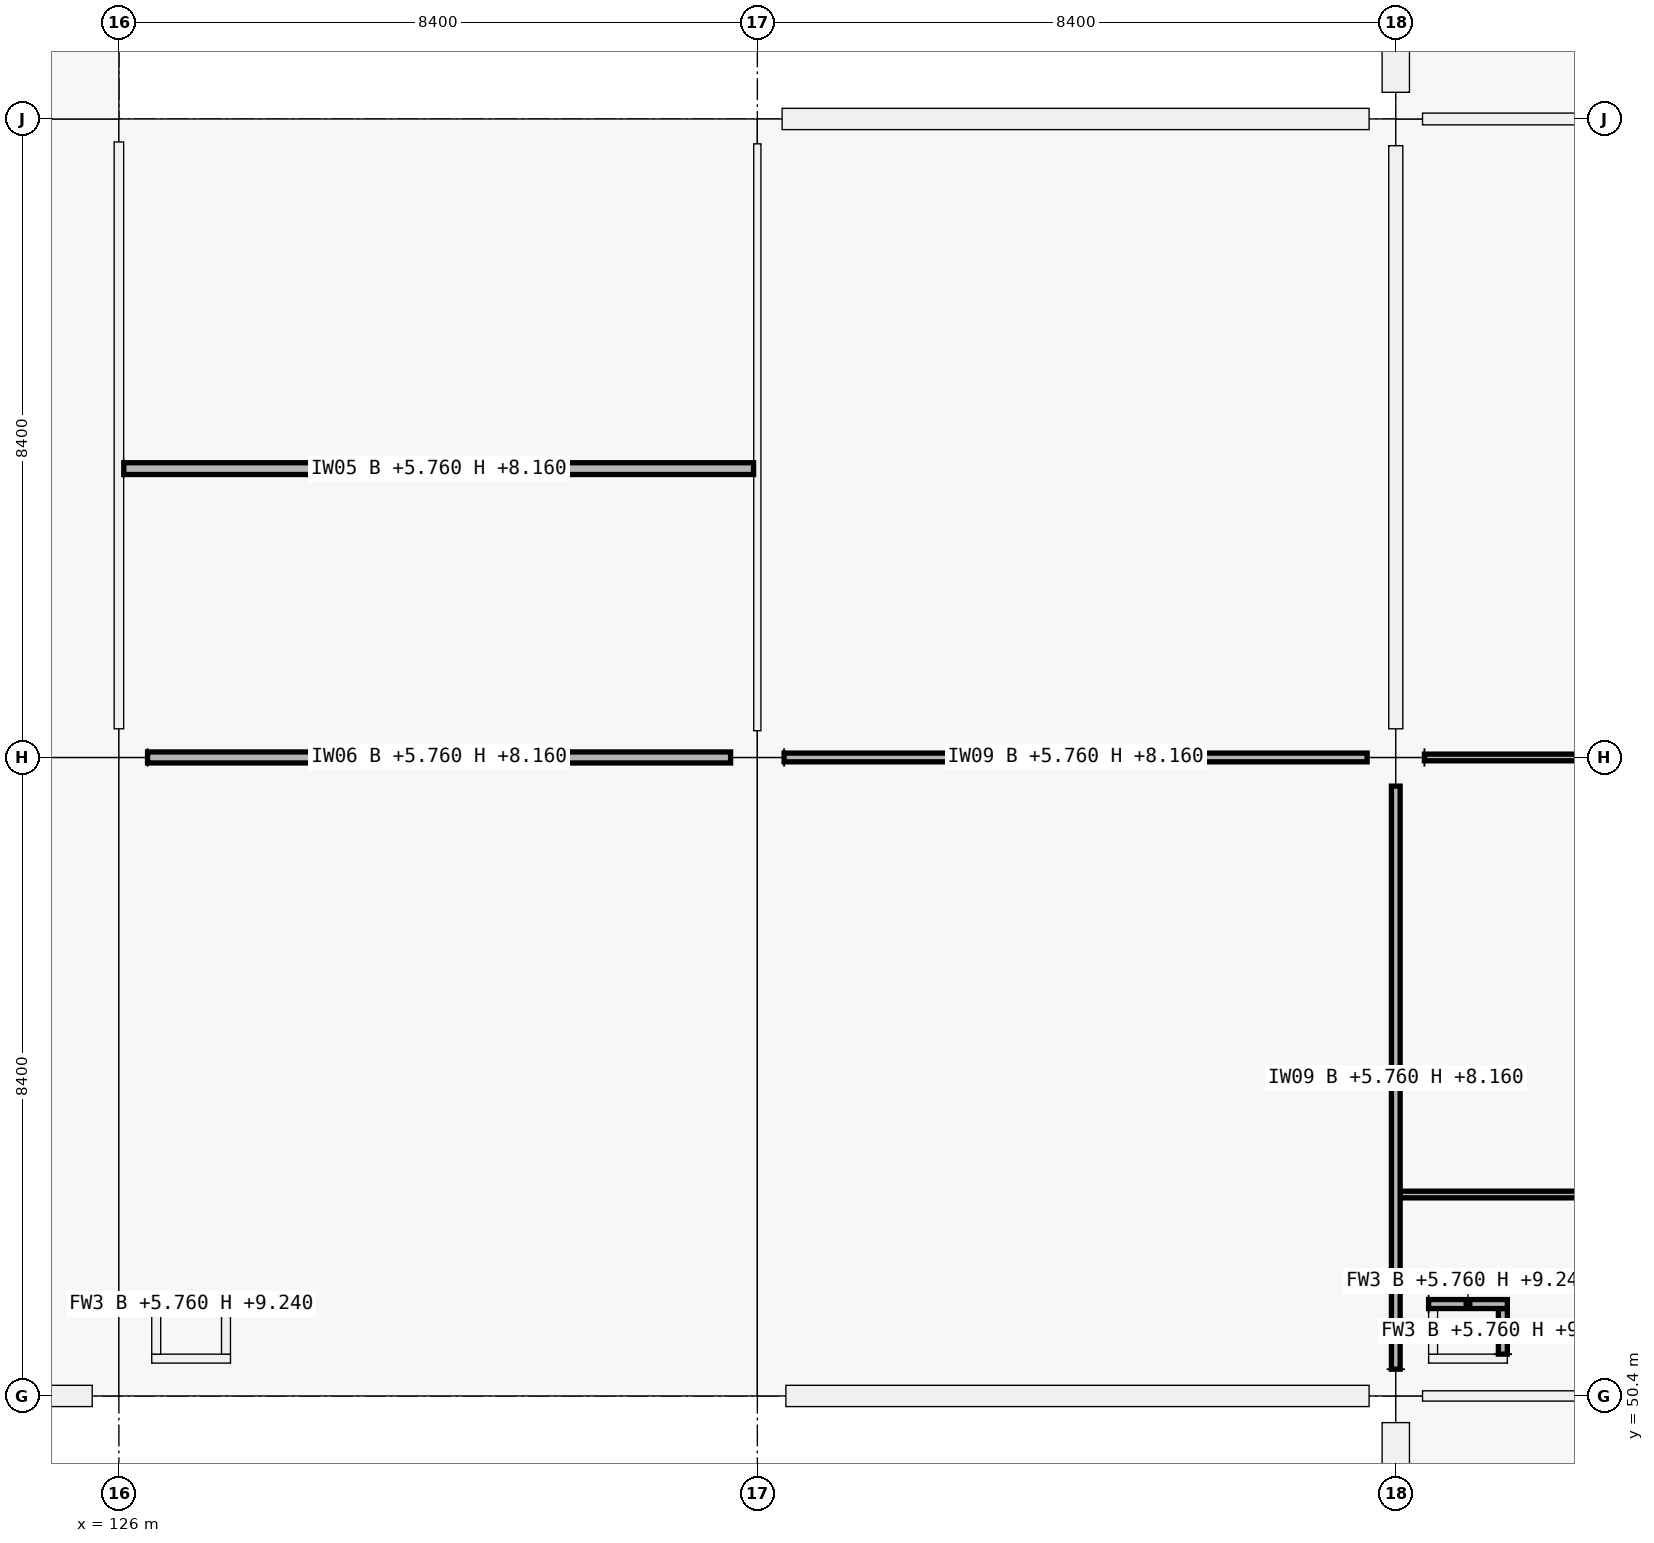
"""IFC4 building model, lengths in metres.
Left out: names, types, materials, properties, quantities, classifications, styles, units other than length and angle.
Written with IfcOpenShell. Run it as: python <this file> out.ifc"""

import sys

from ifc_helpers import new_model, si_unit, direction, frame, frame_2d, origin, origin_2d, place, context, subcontext, project, spatial, rectangle, extrude, element, fill, save


model = new_model("IFC4")
c1 = context("Model", 3, precision=1e-05, world=origin(), true_north=direction((0.0, 1.0)))
c2 = subcontext(c1, "Body", "Model", "MODEL_VIEW")
j1 = project(units=[si_unit("LENGTHUNIT", "METRE"), si_unit("PLANEANGLEUNIT", "RADIAN")], contexts=[c1])
p1 = place(None, origin())
s1 = spatial("IfcSite", under=j1, at=p1, CompositionType="ELEMENT")
p2 = place(p1, origin())
s2 = spatial("IfcBuilding", under=s1, at=p2, CompositionType="ELEMENT")
p3 = place(p2, frame((0.0, 0.0, 5.76)))
s3 = spatial("IfcBuildingStorey", under=s2, at=p3, CompositionType="ELEMENT", Elevation=5.76)
p4 = place(p3, frame((126.0, 50.4, 0.0), z_axis=(0.0, 0.0, 1.0), x_axis=(1.0, 0.0, 0.0)))
e1 = element("IfcColumn", 1, at=p4, inside=s3, PredefinedType="COLUMN", context=c2, shape_type="SweptSolid", body=[
    extrude(rectangle(XDim=0.7, YDim=0.7, at=origin_2d()), origin(), (0.0, 0.0, 1.0), 4.5),
])
p5 = place(p3, frame((126.0, 58.8, 0.0), z_axis=(0.0, 0.0, 1.0), x_axis=(1.0, 0.0, 0.0)))
e2 = element("IfcColumn", 2, at=p5, inside=s3, PredefinedType="COLUMN", context=c2, shape_type="SweptSolid", body=[
    extrude(rectangle(XDim=0.75, YDim=0.75, at=origin_2d()), origin(), (0.0, 0.0, 1.0), 4.5),
])
p6 = place(p3, frame((126.0, 67.2, 0.0), z_axis=(0.0, 0.0, 1.0), x_axis=(1.0, 0.0, 0.0)))
e3 = element("IfcColumn", 3, at=p6, inside=s3, PredefinedType="COLUMN", context=c2, shape_type="SweptSolid", body=[
    extrude(rectangle(XDim=0.6, YDim=0.6, at=origin_2d()), origin(), (0.0, 0.0, 1.0), 4.5),
])
p7 = place(p3, frame((134.4, 50.4, 0.0), z_axis=(0.0, 0.0, 1.0), x_axis=(1.0, 0.0, 0.0)))
e4 = element("IfcColumn", 4, at=p7, inside=s3, PredefinedType="COLUMN", context=c2, shape_type="SweptSolid", body=[
    extrude(rectangle(XDim=0.75, YDim=0.75, at=origin_2d()), origin(), (0.0, 0.0, 1.0), 4.5),
])
p8 = place(p3, frame((134.4, 58.8, 0.0), z_axis=(0.0, 0.0, 1.0), x_axis=(1.0, 0.0, 0.0)))
e5 = element("IfcColumn", 5, at=p8, inside=s3, PredefinedType="COLUMN", context=c2, shape_type="SweptSolid", body=[
    extrude(rectangle(XDim=0.7, YDim=0.7, at=origin_2d()), origin(), (0.0, 0.0, 1.0), 4.5),
])
p9 = place(p3, frame((134.4, 67.2, 0.0), z_axis=(0.0, 0.0, 1.0), x_axis=(1.0, 0.0, 0.0)))
e6 = element("IfcColumn", 6, at=p9, inside=s3, PredefinedType="COLUMN", context=c2, shape_type="SweptSolid", body=[
    extrude(rectangle(XDim=0.65, YDim=0.65, at=origin_2d()), origin(), (0.0, 0.0, 1.0), 4.5),
])
p10 = place(p3, frame((142.8, 50.4, 0.0), z_axis=(0.0, 0.0, 1.0), x_axis=(1.0, 0.0, 0.0)))
e7 = element("IfcColumn", 7, at=p10, inside=s3, PredefinedType="COLUMN", context=c2, shape_type="SweptSolid", body=[
    extrude(rectangle(XDim=0.7, YDim=0.7, at=origin_2d()), origin(), (0.0, 0.0, 1.0), 4.5),
])
p11 = place(p3, frame((142.8, 58.8, 0.0), z_axis=(0.0, 0.0, 1.0), x_axis=(1.0, 0.0, 0.0)))
e8 = element("IfcColumn", 8, at=p11, inside=s3, PredefinedType="COLUMN", context=c2, shape_type="SweptSolid", body=[
    extrude(rectangle(XDim=0.75, YDim=0.75, at=origin_2d()), origin(), (0.0, 0.0, 1.0), 4.5),
])
p12 = place(p3, frame((142.8, 67.2, 0.0), z_axis=(0.0, 0.0, 1.0), x_axis=(1.0, 0.0, 0.0)))
e9 = element("IfcColumn", 9, at=p12, inside=s3, PredefinedType="COLUMN", context=c2, shape_type="SweptSolid", body=[
    extrude(rectangle(XDim=0.7, YDim=0.7, at=origin_2d()), origin(), (0.0, 0.0, 1.0), 4.5),
])
p13 = place(p3, frame((125.649, 50.4, 0.0), z_axis=(0.0, 0.0, 1.0), x_axis=(-1.0, 0.0, 0.0)))
e10 = element("IfcWall", 10, at=p13, inside=s3, PredefinedType="SOLIDWALL", context=c2, shape_type="SweptSolid", body=[
    extrude(rectangle(XDim=7.673, YDim=0.28, at=frame_2d((3.836, 0.0))), origin(), (0.0, 0.0, 1.0), 3.4),
])
p14 = place(p13, frame((2.236, 0.0, 0.9)))
e11 = element("IfcOpeningElement", 11, at=p14, cuts=e10, PredefinedType="OPENING", context=c2, shape_type="SweptSolid", body=[
    extrude(rectangle(XDim=3.2, YDim=1.75, at=frame_2d((1.6, 0.875))), frame((0.0, 0.14, 0.0), z_axis=(0.0, -1.0, 0.0), x_axis=(1.0, 0.0, 0.0)), (0.0, 0.0, 1.0), 0.28),
])
p15 = place(p3, frame((142.449, 50.4, 0.0), z_axis=(0.0, 0.0, 1.0), x_axis=(-1.0, 0.0, 0.0)))
e12 = element("IfcWall", 12, at=p15, inside=s3, PredefinedType="SOLIDWALL", context=c2, shape_type="SweptSolid", body=[
    extrude(rectangle(XDim=7.673, YDim=0.28, at=frame_2d((3.836, 0.0))), origin(), (0.0, 0.0, 1.0), 3.4),
])
p16 = place(p3, frame((134.726, 67.2, 0.0), z_axis=(0.0, 0.0, 1.0), x_axis=(1.0, 0.0, 0.0)))
e13 = element("IfcWall", 13, at=p16, inside=s3, PredefinedType="SOLIDWALL", context=c2, shape_type="SweptSolid", body=[
    extrude(rectangle(XDim=7.723, YDim=0.28, at=frame_2d((3.861, 0.0))), origin(), (0.0, 0.0, 1.0), 3.4),
])
p17 = place(p16, frame((2.662, 0.0, 0.9)))
e14 = element("IfcOpeningElement", 14, at=p17, cuts=e13, PredefinedType="OPENING", context=c2, shape_type="SweptSolid", body=[
    extrude(rectangle(XDim=2.4, YDim=2.25, at=frame_2d((1.2, 1.125))), frame((0.0, 0.14, 0.0), z_axis=(0.0, -1.0, 0.0), x_axis=(1.0, 0.0, 0.0)), (0.0, 0.0, 1.0), 0.28),
])
p18 = place(p3, frame((142.8, 42.376, 0.0), z_axis=(0.0, 0.0, 1.0), x_axis=(0.0, 1.0, 0.0)))
e15 = element("IfcWall", 15, at=p18, inside=s3, PredefinedType="SOLIDWALL", context=c2, shape_type="SweptSolid", body=[
    extrude(rectangle(XDim=7.673, YDim=0.36, at=frame_2d((3.836, 0.0))), origin(), (0.0, 0.0, 1.0), 3.4),
])
p19 = place(p18, frame((3.386, 0.0, 0.9)))
e16 = element("IfcOpeningElement", 16, at=p19, cuts=e15, PredefinedType="OPENING", context=c2, shape_type="SweptSolid", body=[
    extrude(rectangle(XDim=0.9, YDim=1.5, at=frame_2d((0.45, 0.75))), frame((0.0, 0.18, 0.0), z_axis=(0.0, -1.0, 0.0), x_axis=(1.0, 0.0, 0.0)), (0.0, 0.0, 1.0), 0.36),
])
p20 = place(p3, frame((142.8, 67.551, 0.0), z_axis=(0.0, 0.0, 1.0), x_axis=(0.0, 1.0, 0.0)))
e17 = element("IfcWall", 17, at=p20, inside=s3, PredefinedType="SOLIDWALL", context=c2, shape_type="SweptSolid", body=[
    extrude(rectangle(XDim=7.773, YDim=0.36, at=frame_2d((3.886, 0.0))), origin(), (0.0, 0.0, 1.0), 3.4),
])
p21 = place(p20, frame((3.036, 0.0, 0.9)))
e18 = element("IfcOpeningElement", 18, at=p21, cuts=e17, PredefinedType="OPENING", context=c2, shape_type="SweptSolid", body=[
    extrude(rectangle(XDim=1.7, YDim=1.85, at=frame_2d((0.85, 0.925))), frame((0.0, 0.18, 0.0), z_axis=(0.0, -1.0, 0.0), x_axis=(1.0, 0.0, 0.0)), (0.0, 0.0, 1.0), 0.36),
])
for number, where, z_axis, x_axis in (
    (19, (126.432, 50.891, 0.0), (0.0, 0.0, 1.0), (1.0, 0.0, 0.0)),
    (20, (126.432, 51.609, 0.0), (0.0, 0.0, 1.0), (1.0, 0.0, 0.0)),
):
    element("IfcWall", number, at=place(p3, frame(where, z_axis=z_axis, x_axis=x_axis)), inside=s3, PredefinedType="PARTITIONING", context=c2, shape_type="SweptSolid", body=[
        extrude(rectangle(XDim=1.036, YDim=0.118, at=frame_2d((0.518, 0.0))), origin(), (0.0, 0.0, 1.0), 3.48),
    ])
for number, where, z_axis, x_axis in (
    (21, (126.491, 50.95, 0.0), (0.0, 0.0, 1.0), (0.0, 1.0, 0.0)),
    (22, (127.409, 50.95, 0.0), (0.0, 0.0, 1.0), (0.0, 1.0, 0.0)),
):
    element("IfcWall", number, at=place(p3, frame(where, z_axis=z_axis, x_axis=x_axis)), inside=s3, PredefinedType="PARTITIONING", context=c2, shape_type="SweptSolid", body=[
        extrude(rectangle(XDim=0.6, YDim=0.118, at=frame_2d((0.3, 0.0))), origin(), (0.0, 0.0, 1.0), 3.48),
    ])
for number, where, z_axis, x_axis in (
    (23, (143.232, 50.891, 0.0), (0.0, 0.0, 1.0), (1.0, 0.0, 0.0)),
    (24, (143.232, 51.609, 0.0), (0.0, 0.0, 1.0), (1.0, 0.0, 0.0)),
):
    element("IfcWall", number, at=place(p3, frame(where, z_axis=z_axis, x_axis=x_axis)), inside=s3, PredefinedType="PARTITIONING", context=c2, shape_type="SweptSolid", body=[
        extrude(rectangle(XDim=1.036, YDim=0.118, at=frame_2d((0.518, 0.0))), origin(), (0.0, 0.0, 1.0), 3.48),
    ])
for number, where, z_axis, x_axis in (
    (25, (143.291, 50.95, 0.0), (0.0, 0.0, 1.0), (0.0, 1.0, 0.0)),
    (26, (144.209, 50.95, 0.0), (0.0, 0.0, 1.0), (0.0, 1.0, 0.0)),
):
    element("IfcWall", number, at=place(p3, frame(where, z_axis=z_axis, x_axis=x_axis)), inside=s3, PredefinedType="PARTITIONING", context=c2, shape_type="SweptSolid", body=[
        extrude(rectangle(XDim=0.6, YDim=0.118, at=frame_2d((0.3, 0.0))), origin(), (0.0, 0.0, 1.0), 3.48),
    ])
p22 = place(p3, frame((126.377, 58.8, 0.0), z_axis=(0.0, 0.0, 1.0), x_axis=(1.0, 0.0, 0.0)))
e27 = element("IfcWall", 27, at=p22, inside=s3, PredefinedType="PARTITIONING", context=c2, shape_type="SweptSolid", body=[
    extrude(rectangle(XDim=7.671, YDim=0.145, at=frame_2d((3.835, 0.0))), origin(), (0.0, 0.0, 1.0), 2.4),
])
p23 = place(p3, frame((134.752, 58.8, 0.0), z_axis=(0.0, 0.0, 1.0), x_axis=(1.0, 0.0, 0.0)))
e28 = element("IfcWall", 28, at=p23, inside=s3, PredefinedType="PARTITIONING", context=c2, shape_type="SweptSolid", body=[
    extrude(rectangle(XDim=7.671, YDim=0.115, at=frame_2d((3.835, 0.0))), origin(), (0.0, 0.0, 1.0), 2.4),
])
p24 = place(p23, frame((3.356, 0.0, 0.0)))
e29 = element("IfcOpeningElement", 29, at=p24, cuts=e28, PredefinedType="OPENING", context=c2, shape_type="SweptSolid", body=[
    extrude(rectangle(XDim=0.96, YDim=2.18, at=frame_2d((0.48, 1.09))), frame((0.0, 0.058, 0.0), z_axis=(0.0, -1.0, 0.0), x_axis=(1.0, 0.0, 0.0)), (0.0, 0.0, 1.0), 0.115),
])
p25 = place(p3, frame((143.152, 50.4, 0.0), z_axis=(0.0, 0.0, 1.0), x_axis=(1.0, 0.0, 0.0)))
e30 = element("IfcWall", 30, at=p25, inside=s3, PredefinedType="PARTITIONING", context=c2, shape_type="SweptSolid", body=[
    extrude(rectangle(XDim=7.671, YDim=0.135, at=frame_2d((3.835, 0.0))), origin(), (0.0, 0.0, 1.0), 2.4),
])
p26 = place(p3, frame((143.177, 58.8, 0.0), z_axis=(0.0, 0.0, 1.0), x_axis=(1.0, 0.0, 0.0)))
e31 = element("IfcWall", 31, at=p26, inside=s3, PredefinedType="PARTITIONING", context=c2, shape_type="SweptSolid", body=[
    extrude(rectangle(XDim=7.671, YDim=0.088, at=frame_2d((3.835, 0.0))), origin(), (0.0, 0.0, 1.0), 2.4),
])
p27 = place(p3, frame((143.152, 67.2, 0.0), z_axis=(0.0, 0.0, 1.0), x_axis=(1.0, 0.0, 0.0)))
e32 = element("IfcWall", 32, at=p27, inside=s3, PredefinedType="PARTITIONING", context=c2, shape_type="SweptSolid", body=[
    extrude(rectangle(XDim=7.671, YDim=0.155, at=frame_2d((3.835, 0.0))), origin(), (0.0, 0.0, 1.0), 2.4),
])
p28 = place(p27, frame((3.336, 0.0, 0.0)))
e33 = element("IfcOpeningElement", 33, at=p28, cuts=e32, PredefinedType="OPENING", context=c2, shape_type="SweptSolid", body=[
    extrude(rectangle(XDim=1.0, YDim=2.2, at=frame_2d((0.5, 1.1))), frame((0.0, 0.078, 0.0), z_axis=(0.0, -1.0, 0.0), x_axis=(1.0, 0.0, 0.0)), (0.0, 0.0, 1.0), 0.155),
])
p29 = place(p3, frame((126.0, 59.177, 0.0), z_axis=(0.0, 0.0, 1.0), x_axis=(0.0, 1.0, 0.0)))
e34 = element("IfcWall", 34, at=p29, inside=s3, PredefinedType="PARTITIONING", context=c2, shape_type="SweptSolid", body=[
    extrude(rectangle(XDim=7.721, YDim=0.125, at=frame_2d((3.86, 0.0))), origin(), (0.0, 0.0, 1.0), 2.4),
])
p30 = place(p29, frame((1.143, 0.0, 0.0)))
e35 = element("IfcOpeningElement", 35, at=p30, cuts=e34, PredefinedType="OPENING", context=c2, shape_type="SweptSolid", body=[
    extrude(rectangle(XDim=1.04, YDim=2.2, at=frame_2d((0.52, 1.1))), frame((0.0, 0.062, 0.0), z_axis=(0.0, -1.0, 0.0), x_axis=(1.0, 0.0, 0.0)), (0.0, 0.0, 1.0), 0.125),
])
p31 = place(p29, frame((5.073, 0.0, 0.0)))
e36 = element("IfcOpeningElement", 36, at=p31, cuts=e34, PredefinedType="OPENING", context=c2, shape_type="SweptSolid", body=[
    extrude(rectangle(XDim=1.02, YDim=2.2, at=frame_2d((0.51, 1.1))), frame((0.0, 0.062, 0.0), z_axis=(0.0, -1.0, 0.0), x_axis=(1.0, 0.0, 0.0)), (0.0, 0.0, 1.0), 0.125),
])
p32 = place(p3, frame((134.4, 59.152, 0.0), z_axis=(0.0, 0.0, 1.0), x_axis=(0.0, 1.0, 0.0)))
e37 = element("IfcWall", 37, at=p32, inside=s3, PredefinedType="PARTITIONING", context=c2, shape_type="SweptSolid", body=[
    extrude(rectangle(XDim=7.721, YDim=0.095, at=frame_2d((3.86, 0.0))), origin(), (0.0, 0.0, 1.0), 2.4),
])
p33 = place(p3, frame((142.8, 50.752, 0.0), z_axis=(0.0, 0.0, 1.0), x_axis=(0.0, 1.0, 0.0)))
e38 = element("IfcWall", 38, at=p33, inside=s3, PredefinedType="PARTITIONING", context=c2, shape_type="SweptSolid", body=[
    extrude(rectangle(XDim=7.671, YDim=0.115, at=frame_2d((3.835, 0.0))), origin(), (0.0, 0.0, 1.0), 2.4),
])
p34 = place(p33, frame((0.623, 0.0, 0.0)))
e39 = element("IfcOpeningElement", 39, at=p34, cuts=e38, PredefinedType="OPENING", context=c2, shape_type="SweptSolid", body=[
    extrude(rectangle(XDim=0.98, YDim=2.08, at=frame_2d((0.49, 1.04))), frame((0.0, 0.058, 0.0), z_axis=(0.0, -1.0, 0.0), x_axis=(1.0, 0.0, 0.0)), (0.0, 0.0, 1.0), 0.115),
])
p35 = place(p33, frame((4.563, 0.0, 0.0)))
e40 = element("IfcOpeningElement", 40, at=p35, cuts=e38, PredefinedType="OPENING", context=c2, shape_type="SweptSolid", body=[
    extrude(rectangle(XDim=0.94, YDim=2.08, at=frame_2d((0.47, 1.04))), frame((0.0, 0.058, 0.0), z_axis=(0.0, -1.0, 0.0), x_axis=(1.0, 0.0, 0.0)), (0.0, 0.0, 1.0), 0.115),
])
p36 = place(p3, frame((142.8, 59.177, 0.0), z_axis=(0.0, 0.0, 1.0), x_axis=(0.0, 1.0, 0.0)))
e41 = element("IfcWall", 41, at=p36, inside=s3, PredefinedType="PARTITIONING", context=c2, shape_type="SweptSolid", body=[
    extrude(rectangle(XDim=7.671, YDim=0.185, at=frame_2d((3.835, 0.0))), origin(), (0.0, 0.0, 1.0), 2.4),
])
p37 = place(p36, frame((3.376, 0.0, 0.0)))
e42 = element("IfcOpeningElement", 42, at=p37, cuts=e41, PredefinedType="OPENING", context=c2, shape_type="SweptSolid", body=[
    extrude(rectangle(XDim=0.92, YDim=2.15, at=frame_2d((0.46, 1.075))), frame((0.0, 0.093, 0.0), z_axis=(0.0, -1.0, 0.0), x_axis=(1.0, 0.0, 0.0)), (0.0, 0.0, 1.0), 0.185),
])
p38 = place(p3, frame((126.064, 62.6, 0.0), z_axis=(0.0, 0.0, 1.0), x_axis=(1.0, 0.0, 0.0)))
e43 = element("IfcWall", 43, at=p38, inside=s3, PredefinedType="PARTITIONING", context=c2, shape_type="SweptSolid", body=[
    extrude(rectangle(XDim=8.286, YDim=0.155, at=frame_2d((4.143, 0.0))), origin(), (0.0, 0.0, 1.0), 2.4),
])
p39 = place(p3, frame((142.86, 53.05, 0.0), z_axis=(0.0, 0.0, 1.0), x_axis=(1.0, 0.0, 0.0)))
e44 = element("IfcWall", 44, at=p39, inside=s3, PredefinedType="PARTITIONING", context=c2, shape_type="SweptSolid", body=[
    extrude(rectangle(XDim=8.294, YDim=0.088, at=frame_2d((4.147, 0.0))), origin(), (0.0, 0.0, 1.0), 2.4),
])
p40 = place(p17, origin())
e45 = element("IfcWindow", 45, at=p40, inside=s3, PartitioningType="SINGLE_PANEL", PredefinedType="WINDOW", context=c2, shape_type="SweptSolid", body=[
    extrude(rectangle(XDim=2.4, YDim=2.25, at=frame_2d((1.2, 1.125))), frame((0.0, 0.03, 0.0), z_axis=(0.0, -1.0, 0.0), x_axis=(1.0, 0.0, 0.0)), (0.0, 0.0, 1.0), 0.06),
])
fill(e14, e45)
p41 = place(p30, origin())
e46 = element("IfcDoor", 46, at=p41, inside=s3, OperationType="SINGLE_SWING_RIGHT", PredefinedType="DOOR", context=c2, shape_type="SweptSolid", body=[
    extrude(rectangle(XDim=1.04, YDim=2.2, at=frame_2d((0.52, 1.1))), frame((0.0, 0.025, 0.0), z_axis=(0.0, -1.0, 0.0), x_axis=(1.0, 0.0, 0.0)), (0.0, 0.0, 1.0), 0.05),
])
fill(e35, e46)
p42 = place(p31, origin())
e47 = element("IfcDoor", 47, at=p42, inside=s3, OperationType="SINGLE_SWING_LEFT", PredefinedType="DOOR", context=c2, shape_type="SweptSolid", body=[
    extrude(rectangle(XDim=1.02, YDim=2.2, at=frame_2d((0.51, 1.1))), frame((0.0, 0.025, 0.0), z_axis=(0.0, -1.0, 0.0), x_axis=(1.0, 0.0, 0.0)), (0.0, 0.0, 1.0), 0.05),
])
fill(e36, e47)
p43 = place(p34, origin())
e48 = element("IfcDoor", 48, at=p43, inside=s3, OperationType="SINGLE_SWING_RIGHT", PredefinedType="DOOR", context=c2, shape_type="SweptSolid", body=[
    extrude(rectangle(XDim=0.98, YDim=2.08, at=frame_2d((0.49, 1.04))), frame((0.0, 0.025, 0.0), z_axis=(0.0, -1.0, 0.0), x_axis=(1.0, 0.0, 0.0)), (0.0, 0.0, 1.0), 0.05),
])
fill(e39, e48)
p44 = place(p35, origin())
e49 = element("IfcDoor", 49, at=p44, inside=s3, OperationType="SINGLE_SWING_LEFT", PredefinedType="DOOR", context=c2, shape_type="SweptSolid", body=[
    extrude(rectangle(XDim=0.94, YDim=2.08, at=frame_2d((0.47, 1.04))), frame((0.0, 0.025, 0.0), z_axis=(0.0, -1.0, 0.0), x_axis=(1.0, 0.0, 0.0)), (0.0, 0.0, 1.0), 0.05),
])
fill(e40, e49)
p45 = place(p24, origin())
e50 = element("IfcDoor", 50, at=p45, inside=s3, OperationType="SINGLE_SWING_RIGHT", PredefinedType="DOOR", context=c2, shape_type="SweptSolid", body=[
    extrude(rectangle(XDim=0.96, YDim=2.18, at=frame_2d((0.48, 1.09))), frame((0.0, 0.025, 0.0), z_axis=(0.0, -1.0, 0.0), x_axis=(1.0, 0.0, 0.0)), (0.0, 0.0, 1.0), 0.05),
])
fill(e29, e50)
p46 = place(p37, origin())
e51 = element("IfcDoor", 51, at=p46, inside=s3, OperationType="SINGLE_SWING_RIGHT", PredefinedType="DOOR", context=c2, shape_type="SweptSolid", body=[
    extrude(rectangle(XDim=0.92, YDim=2.15, at=frame_2d((0.46, 1.075))), frame((0.0, 0.025, 0.0), z_axis=(0.0, -1.0, 0.0), x_axis=(1.0, 0.0, 0.0)), (0.0, 0.0, 1.0), 0.05),
])
fill(e42, e51)
save(model, sys.argv[1])
